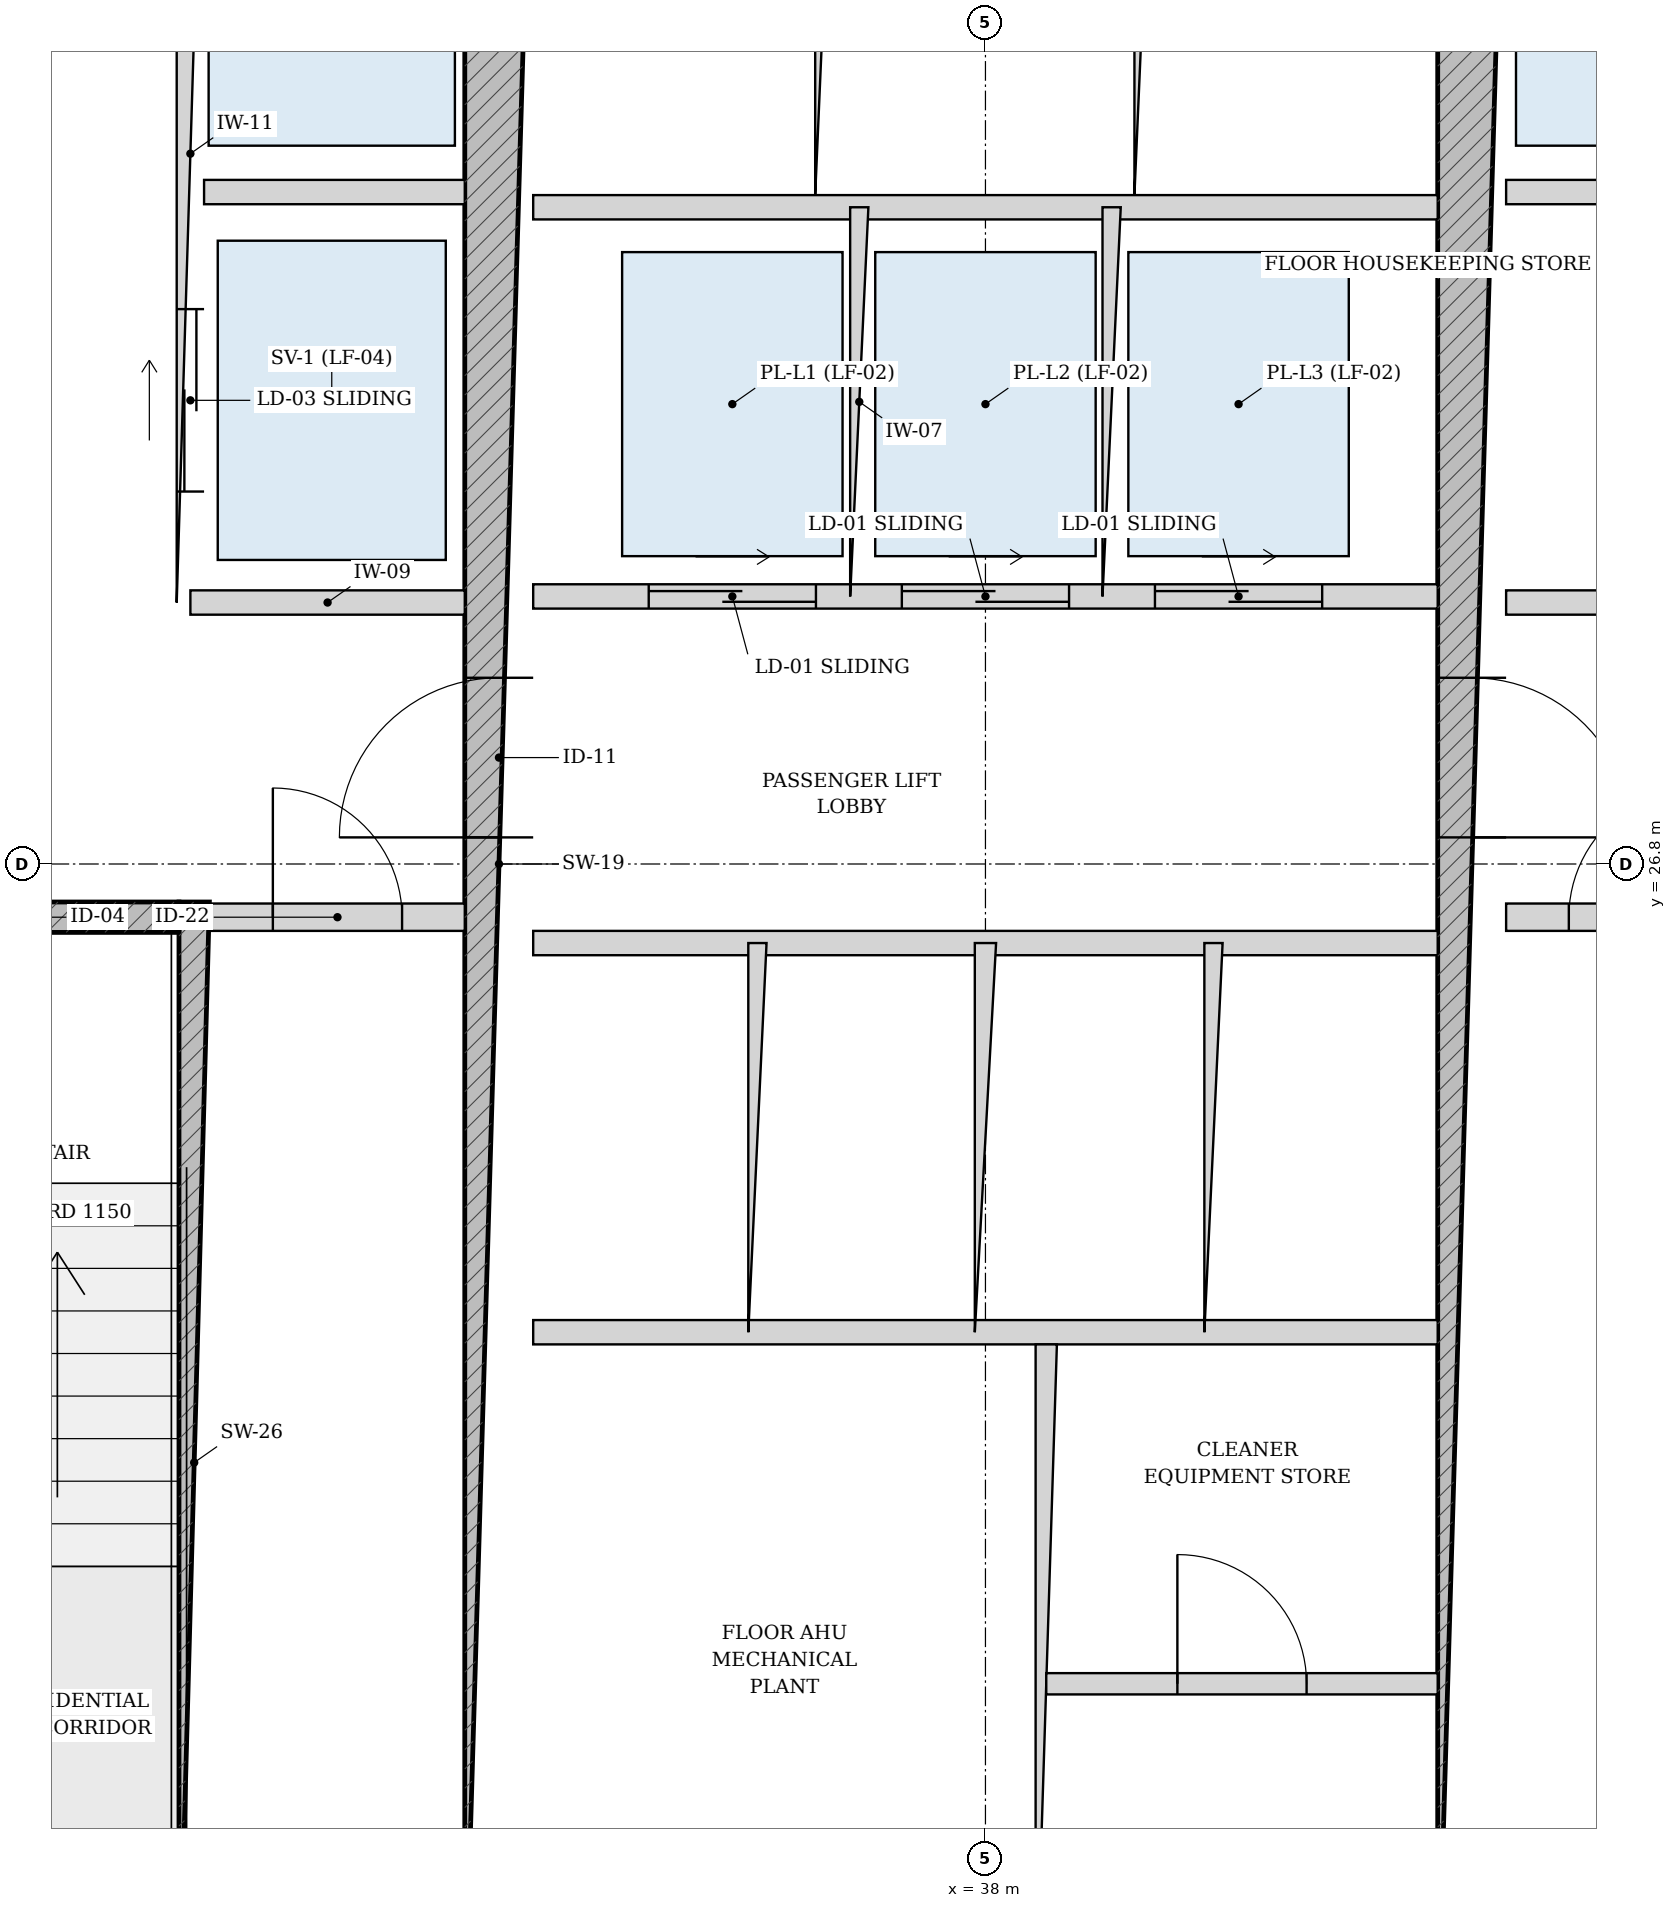
"""IFC4 building model, lengths in metres.
Left out: names, types, materials, properties, quantities, classifications, styles, units other than length and angle.
Written with IfcOpenShell. Run it as: python <this file> out.ifc"""

import sys

from ifc_helpers import new_model, si_unit, direction, frame, frame_2d, origin, place, context, subcontext, project, spatial, rectangle, extrude, source, transform, mapped, element, fill, save


model = new_model("IFC4")
c1 = context("Model", 3, precision=1e-05, world=origin(), true_north=direction((-0.2419218956, 0.970295726276)))
c2 = subcontext(c1, "Body", "Model", "MODEL_VIEW")
j1 = project(units=[si_unit("LENGTHUNIT", "METRE"), si_unit("PLANEANGLEUNIT", "RADIAN")], contexts=[c1])
p1 = place(None, origin())
s1 = spatial("IfcSite", under=j1, at=p1, CompositionType="ELEMENT")
p2 = place(p1, origin())
s2 = spatial("IfcBuilding", under=s1, at=p2, CompositionType="ELEMENT")
p3 = place(p2, frame((0.0, 0.0, 112.2)))
s3 = spatial("IfcBuildingStorey", under=s2, at=p3, CompositionType="ELEMENT", Elevation=112.2)
p4 = place(p3, frame((32.795, 19.175, 0.0), z_axis=(0.0, 0.0, 1.0), x_axis=(0.0, 1.0, 0.0)))
e1 = element("IfcWall", 1, at=p4, inside=s3, PredefinedType="SOLIDWALL", context=c2, shape_type="SweptSolid", body=[
    extrude(rectangle(XDim=7.375, YDim=0.2, at=frame_2d((3.688, 0.0))), origin(), (0.0, 0.0, 1.0), 3.325),
])
p5 = place(p3, frame((29.375, 26.45, 0.0), z_axis=(0.0, 0.0, 1.0), x_axis=(1.0, 0.0, 0.0)))
e2 = element("IfcWall", 2, at=p5, inside=s3, PredefinedType="SOLIDWALL", context=c2, shape_type="SweptSolid", body=[
    extrude(rectangle(XDim=3.32, YDim=0.2, at=frame_2d((1.66, 0.0))), origin(), (0.0, 0.0, 1.0), 3.325),
])
p6 = place(p5, frame((1.185, 0.0, 0.0)))
e3 = element("IfcOpeningElement", 3, at=p6, cuts=e2, PredefinedType="OPENING", context=c2, shape_type="SweptSolid", body=[
    extrude(rectangle(XDim=0.95, YDim=2.15, at=frame_2d((0.475, 1.075))), frame((0.0, 0.11, 0.0), z_axis=(0.0, -1.0, 0.0), x_axis=(1.0, 0.0, 0.0)), (0.0, 0.0, 1.0), 0.22),
])
p7 = place(p3, frame((34.8, 19.175, 0.0), z_axis=(0.0, 0.0, 1.0), x_axis=(0.0, 1.0, 0.0)))
e4 = element("IfcWall", 4, at=p7, inside=s3, PredefinedType="SHEAR", context=c2, shape_type="SweptSolid", body=[
    extrude(rectangle(XDim=15.25, YDim=0.45, at=frame_2d((7.625, 0.0))), origin(), (0.0, 0.0, 1.0), 3.325),
])
p8 = place(p7, frame((7.8, 0.0, 0.0)))
e5 = element("IfcOpeningElement", 5, at=p8, cuts=e4, PredefinedType="OPENING", context=c2, shape_type="SweptSolid", body=[
    extrude(rectangle(XDim=1.05, YDim=2.15, at=frame_2d((0.525, 1.075))), frame((0.0, 0.235, 0.0), z_axis=(0.0, -1.0, 0.0), x_axis=(1.0, 0.0, 0.0)), (0.0, 0.0, 1.0), 0.47),
])
p9 = place(p3, frame((41.2, 19.175, 0.0), z_axis=(0.0, 0.0, 1.0), x_axis=(0.0, 1.0, 0.0)))
e6 = element("IfcWall", 6, at=p9, inside=s3, PredefinedType="SHEAR", context=c2, shape_type="SweptSolid", body=[
    extrude(rectangle(XDim=15.25, YDim=0.45, at=frame_2d((7.625, 0.0))), origin(), (0.0, 0.0, 1.0), 3.325),
])
p10 = place(p9, frame((7.8, 0.0, 0.0)))
e7 = element("IfcOpeningElement", 7, at=p10, cuts=e6, PredefinedType="OPENING", context=c2, shape_type="SweptSolid", body=[
    extrude(rectangle(XDim=1.05, YDim=2.15, at=frame_2d((0.525, 1.075))), frame((0.0, 0.235, 0.0), z_axis=(0.0, -1.0, 0.0), x_axis=(1.0, 0.0, 0.0)), (0.0, 0.0, 1.0), 0.47),
])
p11 = place(p3, frame((32.9, 26.45, 0.0), z_axis=(0.0, 0.0, 1.0), x_axis=(1.0, 0.0, 0.0)))
e8 = element("IfcWall", 8, at=p11, inside=s3, PredefinedType="PARTITIONING", context=c2, shape_type="SweptSolid", body=[
    extrude(rectangle(XDim=1.675, YDim=0.18, at=frame_2d((0.837, 0.0))), origin(), (0.0, 0.0, 1.0), 3.325),
])
p12 = place(p11, frame((0.413, 0.0, 0.0)))
e9 = element("IfcOpeningElement", 9, at=p12, cuts=e8, PredefinedType="OPENING", context=c2, shape_type="SweptSolid", body=[
    extrude(rectangle(XDim=0.85, YDim=2.1, at=frame_2d((0.425, 1.05))), frame((0.0, 0.1, 0.0), z_axis=(0.0, -1.0, 0.0), x_axis=(1.0, 0.0, 0.0)), (0.0, 0.0, 1.0), 0.2),
])
p13 = place(p3, frame((41.425, 26.45, 0.0), z_axis=(0.0, 0.0, 1.0), x_axis=(1.0, 0.0, 0.0)))
e10 = element("IfcWall", 10, at=p13, inside=s3, PredefinedType="PARTITIONING", context=c2, shape_type="SweptSolid", body=[
    extrude(rectangle(XDim=1.675, YDim=0.18, at=frame_2d((0.837, 0.0))), origin(), (0.0, 0.0, 1.0), 3.325),
])
p14 = place(p13, frame((0.413, 0.0, 0.0)))
e11 = element("IfcOpeningElement", 11, at=p14, cuts=e10, PredefinedType="OPENING", context=c2, shape_type="SweptSolid", body=[
    extrude(rectangle(XDim=0.85, YDim=2.1, at=frame_2d((0.425, 1.05))), frame((0.0, 0.1, 0.0), z_axis=(0.0, -1.0, 0.0), x_axis=(1.0, 0.0, 0.0)), (0.0, 0.0, 1.0), 0.2),
])
p15 = place(p3, frame((32.77, 28.52, 0.0), z_axis=(0.0, 0.0, 1.0), x_axis=(0.0, 1.0, 0.0)))
e12 = element("IfcWall", 12, at=p15, inside=s3, PredefinedType="PARTITIONING", context=c2, shape_type="SweptSolid", body=[
    extrude(rectangle(XDim=5.905, YDim=0.18, at=frame_2d((2.953, 0.0))), origin(), (0.0, 0.0, 1.0), 3.325),
])
p16 = place(p15, frame((3.655, 0.0, 0.0)))
e13 = element("IfcOpeningElement", 13, at=p16, cuts=e12, PredefinedType="OPENING", context=c2, shape_type="SweptSolid", body=[
    extrude(rectangle(XDim=1.15, YDim=2.2, at=frame_2d((0.575, 1.1))), frame((0.0, 0.1, 0.0), z_axis=(0.0, -1.0, 0.0), x_axis=(1.0, 0.0, 0.0)), (0.0, 0.0, 1.0), 0.2),
])
p17 = place(p15, frame((0.73, 0.0, 0.0)))
e14 = element("IfcOpeningElement", 14, at=p17, cuts=e12, PredefinedType="OPENING", context=c2, shape_type="SweptSolid", body=[
    extrude(rectangle(XDim=1.2, YDim=2.25, at=frame_2d((0.6, 1.125))), frame((0.0, 0.1, 0.0), z_axis=(0.0, -1.0, 0.0), x_axis=(1.0, 0.0, 0.0)), (0.0, 0.0, 1.0), 0.2),
])
p18 = place(p3, frame((32.86, 31.22, 0.0), z_axis=(0.0, 0.0, 1.0), x_axis=(1.0, 0.0, 0.0)))
e15 = element("IfcWall", 15, at=p18, inside=s3, PredefinedType="PARTITIONING", context=c2, shape_type="SweptSolid", body=[
    extrude(rectangle(XDim=1.715, YDim=0.16, at=frame_2d((0.857, 0.0))), origin(), (0.0, 0.0, 1.0), 3.325),
])
p19 = place(p3, frame((32.77, 28.52, 0.0), z_axis=(0.0, 0.0, 1.0), x_axis=(1.0, 0.0, 0.0)))
e16 = element("IfcWall", 16, at=p19, inside=s3, PredefinedType="PARTITIONING", context=c2, shape_type="SweptSolid", body=[
    extrude(rectangle(XDim=1.805, YDim=0.16, at=frame_2d((0.902, 0.0))), origin(), (0.0, 0.0, 1.0), 3.325),
])
p20 = place(p3, frame((41.425, 31.22, 0.0), z_axis=(0.0, 0.0, 1.0), x_axis=(1.0, 0.0, 0.0)))
e17 = element("IfcWall", 17, at=p20, inside=s3, PredefinedType="PARTITIONING", context=c2, shape_type="SweptSolid", body=[
    extrude(rectangle(XDim=1.715, YDim=0.16, at=frame_2d((0.857, 0.0))), origin(), (0.0, 0.0, 1.0), 3.325),
])
p21 = place(p3, frame((41.425, 28.52, 0.0), z_axis=(0.0, 0.0, 1.0), x_axis=(1.0, 0.0, 0.0)))
e18 = element("IfcWall", 18, at=p21, inside=s3, PredefinedType="PARTITIONING", context=c2, shape_type="SweptSolid", body=[
    extrude(rectangle(XDim=1.805, YDim=0.16, at=frame_2d((0.902, 0.0))), origin(), (0.0, 0.0, 1.0), 3.325),
])
p22 = place(p3, frame((35.025, 28.56, 0.0), z_axis=(0.0, 0.0, 1.0), x_axis=(1.0, 0.0, 0.0)))
e19 = element("IfcWall", 19, at=p22, inside=s3, PredefinedType="PARTITIONING", context=c2, shape_type="SweptSolid", body=[
    extrude(rectangle(XDim=5.95, YDim=0.16, at=frame_2d((2.975, 0.0))), origin(), (0.0, 0.0, 1.0), 3.325),
])
p23 = place(p22, frame((0.76, 0.0, 0.0)))
e20 = element("IfcOpeningElement", 20, at=p23, cuts=e19, PredefinedType="OPENING", context=c2, shape_type="SweptSolid", body=[
    extrude(rectangle(XDim=1.1, YDim=2.2, at=frame_2d((0.55, 1.1))), frame((0.0, 0.09, 0.0), z_axis=(0.0, -1.0, 0.0), x_axis=(1.0, 0.0, 0.0)), (0.0, 0.0, 1.0), 0.18),
])
p24 = place(p22, frame((2.425, 0.0, 0.0)))
e21 = element("IfcOpeningElement", 21, at=p24, cuts=e19, PredefinedType="OPENING", context=c2, shape_type="SweptSolid", body=[
    extrude(rectangle(XDim=1.1, YDim=2.2, at=frame_2d((0.55, 1.1))), frame((0.0, 0.09, 0.0), z_axis=(0.0, -1.0, 0.0), x_axis=(1.0, 0.0, 0.0)), (0.0, 0.0, 1.0), 0.18),
])
p25 = place(p22, frame((4.09, 0.0, 0.0)))
e22 = element("IfcOpeningElement", 22, at=p25, cuts=e19, PredefinedType="OPENING", context=c2, shape_type="SweptSolid", body=[
    extrude(rectangle(XDim=1.1, YDim=2.2, at=frame_2d((0.55, 1.1))), frame((0.0, 0.09, 0.0), z_axis=(0.0, -1.0, 0.0), x_axis=(1.0, 0.0, 0.0)), (0.0, 0.0, 1.0), 0.18),
])
p26 = place(p3, frame((35.025, 31.12, 0.0), z_axis=(0.0, 0.0, 1.0), x_axis=(1.0, 0.0, 0.0)))
e23 = element("IfcWall", 23, at=p26, inside=s3, PredefinedType="PARTITIONING", context=c2, shape_type="SweptSolid", body=[
    extrude(rectangle(XDim=5.95, YDim=0.16, at=frame_2d((2.975, 0.0))), origin(), (0.0, 0.0, 1.0), 3.325),
])
for number, where, z_axis, x_axis in (
    (24, (37.17, 28.56, 0.0), (0.0, 0.0, 1.0), (0.0, 1.0, 0.0)),
    (25, (38.83, 28.56, 0.0), (0.0, 0.0, 1.0), (0.0, 1.0, 0.0)),
):
    element("IfcWall", number, at=place(p3, frame(where, z_axis=z_axis, x_axis=x_axis)), inside=s3, PredefinedType="PARTITIONING", context=c2, shape_type="SweptSolid", body=[
        extrude(rectangle(XDim=2.56, YDim=0.12, at=frame_2d((1.28, 0.0))), origin(), (0.0, 0.0, 1.0), 3.325),
    ])
for number, where, z_axis, x_axis in (
    (26, (36.95, 31.2, 0.0), (0.0, 0.0, 1.0), (0.0, 1.0, 0.0)),
    (27, (39.05, 31.2, 0.0), (0.0, 0.0, 1.0), (0.0, 1.0, 0.0)),
):
    element("IfcWall", number, at=place(p3, frame(where, z_axis=z_axis, x_axis=x_axis)), inside=s3, PredefinedType="PARTITIONING", context=c2, shape_type="SweptSolid", body=[
        extrude(rectangle(XDim=3.225, YDim=0.14, at=frame_2d((1.613, 0.0))), origin(), (0.0, 0.0, 1.0), 3.325),
    ])
for number, where, z_axis, x_axis in (
    (28, (35.025, 26.28, 0.0), (0.0, 0.0, 1.0), (1.0, 0.0, 0.0)),
    (29, (35.025, 23.72, 0.0), (0.0, 0.0, 1.0), (1.0, 0.0, 0.0)),
):
    element("IfcWall", number, at=place(p3, frame(where, z_axis=z_axis, x_axis=x_axis)), inside=s3, PredefinedType="PARTITIONING", context=c2, shape_type="SweptSolid", body=[
        extrude(rectangle(XDim=5.95, YDim=0.16, at=frame_2d((2.975, 0.0))), origin(), (0.0, 0.0, 1.0), 3.325),
    ])
p27 = place(p3, frame((36.5, 23.72, 0.0), z_axis=(0.0, 0.0, 1.0), x_axis=(0.0, 1.0, 0.0)))
e30 = element("IfcWall", 30, at=p27, inside=s3, PredefinedType="PARTITIONING", context=c2, shape_type="SweptSolid", body=[
    extrude(rectangle(XDim=2.56, YDim=0.12, at=frame_2d((1.28, 0.0))), origin(), (0.0, 0.0, 1.0), 3.325),
])
p28 = place(p3, frame((38.0, 23.72, 0.0), z_axis=(0.0, 0.0, 1.0), x_axis=(0.0, 1.0, 0.0)))
e31 = element("IfcWall", 31, at=p28, inside=s3, PredefinedType="PARTITIONING", context=c2, shape_type="SweptSolid", body=[
    extrude(rectangle(XDim=2.56, YDim=0.14, at=frame_2d((1.28, 0.0))), origin(), (0.0, 0.0, 1.0), 3.325),
])
p29 = place(p3, frame((39.5, 23.72, 0.0), z_axis=(0.0, 0.0, 1.0), x_axis=(0.0, 1.0, 0.0)))
e32 = element("IfcWall", 32, at=p29, inside=s3, PredefinedType="PARTITIONING", context=c2, shape_type="SweptSolid", body=[
    extrude(rectangle(XDim=2.56, YDim=0.12, at=frame_2d((1.28, 0.0))), origin(), (0.0, 0.0, 1.0), 3.325),
])
p30 = place(p3, frame((38.4, 19.175, 0.0), z_axis=(0.0, 0.0, 1.0), x_axis=(0.0, 1.0, 0.0)))
e33 = element("IfcWall", 33, at=p30, inside=s3, PredefinedType="PARTITIONING", context=c2, shape_type="SweptSolid", body=[
    extrude(rectangle(XDim=4.465, YDim=0.14, at=frame_2d((2.232, 0.0))), origin(), (0.0, 0.0, 1.0), 3.325),
])
p31 = place(p3, frame((38.4, 21.407, 0.0), z_axis=(0.0, 0.0, 1.0), x_axis=(1.0, 0.0, 0.0)))
e34 = element("IfcWall", 34, at=p31, inside=s3, PredefinedType="PARTITIONING", context=c2, shape_type="SweptSolid", body=[
    extrude(rectangle(XDim=2.575, YDim=0.14, at=frame_2d((1.288, 0.0))), origin(), (0.0, 0.0, 1.0), 3.325),
])
p32 = place(p31, frame((0.863, 0.0, 0.0)))
e35 = element("IfcOpeningElement", 35, at=p32, cuts=e34, PredefinedType="OPENING", context=c2, shape_type="SweptSolid", body=[
    extrude(rectangle(XDim=0.85, YDim=2.1, at=frame_2d((0.425, 1.05))), frame((0.0, 0.08, 0.0), z_axis=(0.0, -1.0, 0.0), x_axis=(1.0, 0.0, 0.0)), (0.0, 0.0, 1.0), 0.16),
])
m1 = source(origin(), c2, "Body", "SweptSolid", [
    extrude(rectangle(XDim=1.05, YDim=2.15, at=frame_2d((0.525, 1.075))), frame((0.0, 0.025, 0.0), z_axis=(0.0, -1.0, 0.0), x_axis=(1.0, 0.0, 0.0)), (0.0, 0.0, 1.0), 0.05),
])
p33 = place(p8, origin())
e36 = element("IfcDoor", 36, at=p33, inside=s3, OperationType="SINGLE_SWING_LEFT", PredefinedType="DOOR", context=c2, shape_type="MappedRepresentation", body=[
    mapped(m1, transform((0.0, 0.0, 0.0), scale=1.0)),
])
fill(e5, e36)
p34 = place(p10, frame((1.05, 0.0, 0.0), z_axis=(0.0, 0.0, 1.0), x_axis=(-1.0, 0.0, 0.0)))
e37 = element("IfcDoor", 37, at=p34, inside=s3, OperationType="SINGLE_SWING_RIGHT", PredefinedType="DOOR", context=c2, shape_type="MappedRepresentation", body=[
    mapped(m1, transform((0.0, 0.0, 0.0), scale=1.0)),
])
fill(e7, e37)
m2 = source(origin(), c2, "Body", "SweptSolid", [
    extrude(rectangle(XDim=0.85, YDim=2.1, at=frame_2d((0.425, 1.05))), frame((0.0, 0.025, 0.0), z_axis=(0.0, -1.0, 0.0), x_axis=(1.0, 0.0, 0.0)), (0.0, 0.0, 1.0), 0.05),
])
p35 = place(p12, origin())
e38 = element("IfcDoor", 38, at=p35, inside=s3, OperationType="SINGLE_SWING_LEFT", PredefinedType="DOOR", context=c2, shape_type="MappedRepresentation", body=[
    mapped(m2, transform((0.0, 0.0, 0.0), scale=1.0)),
])
fill(e9, e38)
p36 = place(p14, origin())
e39 = element("IfcDoor", 39, at=p36, inside=s3, OperationType="SINGLE_SWING_RIGHT", PredefinedType="DOOR", context=c2, shape_type="MappedRepresentation", body=[
    mapped(m2, transform((0.0, 0.0, 0.0), scale=1.0)),
])
fill(e11, e39)
p37 = place(p32, origin())
e40 = element("IfcDoor", 40, at=p37, inside=s3, OperationType="SINGLE_SWING_LEFT", PredefinedType="DOOR", context=c2, shape_type="MappedRepresentation", body=[
    mapped(m2, transform((0.0, 0.0, 0.0), scale=1.0)),
])
fill(e35, e40)
m3 = source(origin(), c2, "Body", "SweptSolid", [
    extrude(rectangle(XDim=1.2, YDim=2.25, at=frame_2d((0.6, 1.125))), frame((0.0, 0.025, 0.0), z_axis=(0.0, -1.0, 0.0), x_axis=(1.0, 0.0, 0.0)), (0.0, 0.0, 1.0), 0.05),
])
p38 = place(p17, origin())
e41 = element("IfcDoor", 41, at=p38, inside=s3, OperationType="DOUBLE_DOOR_SLIDING", PredefinedType="DOOR", context=c2, shape_type="MappedRepresentation", body=[
    mapped(m3, transform((0.0, 0.0, 0.0), scale=1.0)),
])
fill(e14, e41)
m4 = source(origin(), c2, "Body", "SweptSolid", [
    extrude(rectangle(XDim=1.1, YDim=2.2, at=frame_2d((0.55, 1.1))), frame((0.0, 0.025, 0.0), z_axis=(0.0, -1.0, 0.0), x_axis=(1.0, 0.0, 0.0)), (0.0, 0.0, 1.0), 0.05),
])
p39 = place(p23, origin())
e42 = element("IfcDoor", 42, at=p39, inside=s3, OperationType="DOUBLE_DOOR_SLIDING", PredefinedType="DOOR", context=c2, shape_type="MappedRepresentation", body=[
    mapped(m4, transform((0.0, 0.0, 0.0), scale=1.0)),
])
fill(e20, e42)
p40 = place(p24, origin())
e43 = element("IfcDoor", 43, at=p40, inside=s3, OperationType="DOUBLE_DOOR_SLIDING", PredefinedType="DOOR", context=c2, shape_type="MappedRepresentation", body=[
    mapped(m4, transform((0.0, 0.0, 0.0), scale=1.0)),
])
fill(e21, e43)
p41 = place(p25, origin())
e44 = element("IfcDoor", 44, at=p41, inside=s3, OperationType="DOUBLE_DOOR_SLIDING", PredefinedType="DOOR", context=c2, shape_type="MappedRepresentation", body=[
    mapped(m4, transform((0.0, 0.0, 0.0), scale=1.0)),
])
fill(e22, e44)
save(model, sys.argv[1])
